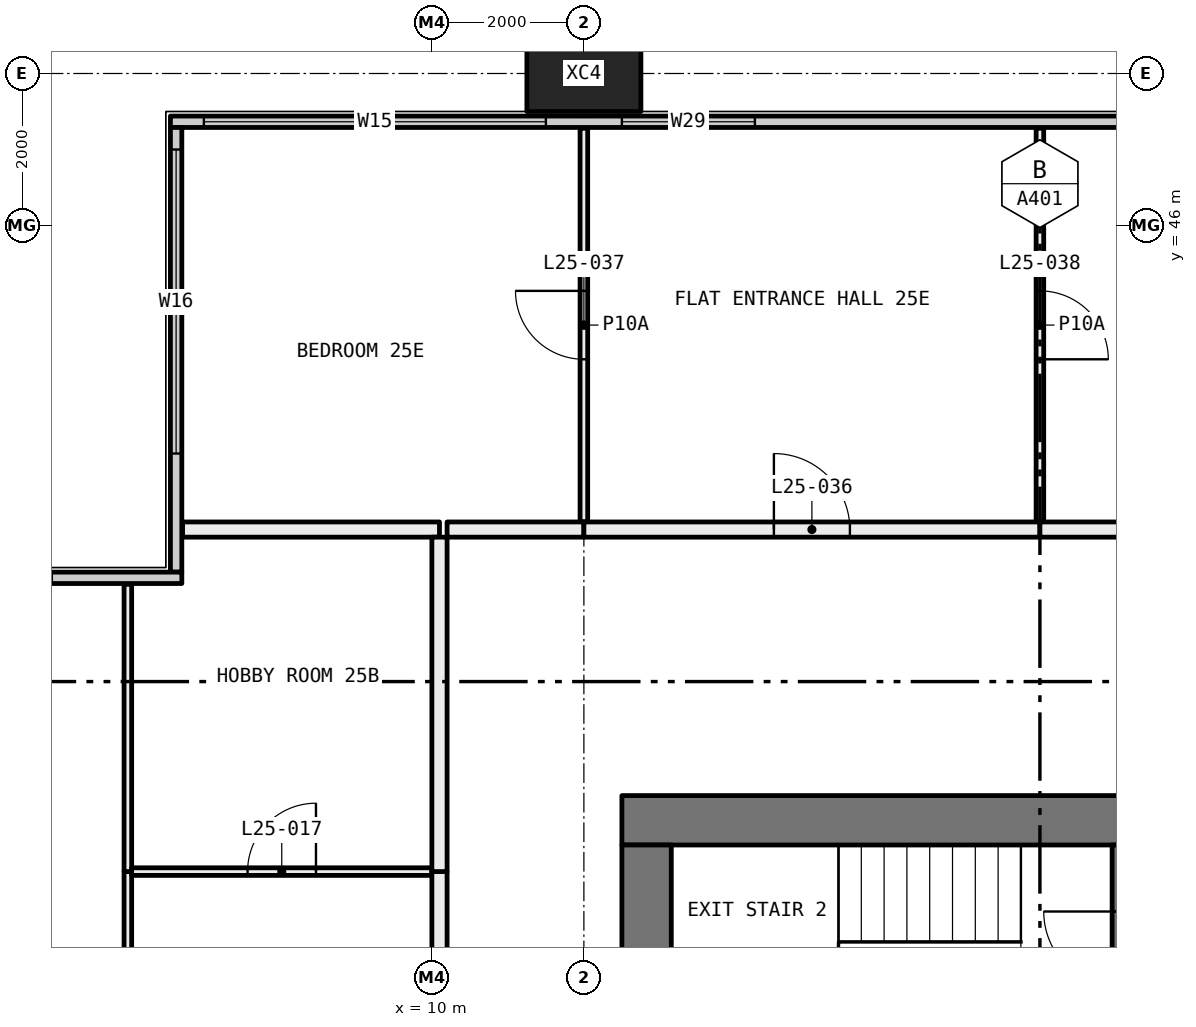
"""IFC4 building model, lengths in metres.
Left out: names, types, materials, properties, quantities, classifications, styles, units other than length and angle.
Written with IfcOpenShell. Run it as: python <this file> out.ifc"""

import sys

from ifc_helpers import new_model, si_unit, direction, frame, frame_2d, origin, origin_2d, place, context, subcontext, project, spatial, rectangle, hollow_rectangle, extrude, element, fill, save


model = new_model("IFC4")
c1 = context("Model", 3, precision=1e-05, world=origin(), true_north=direction((0.0, 1.0)))
c2 = subcontext(c1, "Body", "Model", "MODEL_VIEW")
j1 = project(units=[si_unit("LENGTHUNIT", "METRE"), si_unit("PLANEANGLEUNIT", "RADIAN")], contexts=[c1])
p1 = place(None, origin())
s1 = spatial("IfcSite", under=j1, at=p1, CompositionType="ELEMENT")
p2 = place(p1, origin())
s2 = spatial("IfcBuilding", under=s1, at=p2, CompositionType="ELEMENT")
p3 = place(p2, frame((0.0, 0.0, 100.05)))
s3 = spatial("IfcBuildingStorey", under=s2, at=p3, CompositionType="ELEMENT", Elevation=100.05)
p4 = place(p3, frame((12.0, 48.0, -0.4), z_axis=(0.0, 0.0, 1.0), x_axis=(1.0, 0.0, 0.0)))
e1 = element("IfcColumn", 1, at=p4, inside=s3, PredefinedType="COLUMN", context=c2, shape_type="SweptSolid", body=[
    extrude(hollow_rectangle(XDim=1.5, YDim=1.0, WallThickness=0.06, at=origin_2d()), origin(), (0.0, 0.0, 1.0), 3.45),
])
p5 = place(p3, frame((6.56, 47.365, 0.0), z_axis=(0.0, 0.0, 1.0), x_axis=(1.0, 0.0, 0.0)))
e2 = element("IfcWall", 2, at=p5, inside=s3, PredefinedType="ELEMENTEDWALL", context=c2, shape_type="SweptSolid", body=[
    extrude(rectangle(XDim=58.88, YDim=0.15, at=frame_2d((29.44, 0.0))), origin(), (0.0, 0.0, 1.0), 3.05),
])
p6 = place(p5, frame((0.44, 0.0, 0.45)))
e3 = element("IfcOpeningElement", 3, at=p6, cuts=e2, PredefinedType="OPENING", context=c2, shape_type="SweptSolid", body=[
    extrude(rectangle(XDim=4.5, YDim=2.55, at=frame_2d((2.25, 1.275))), frame((0.0, 0.085, 0.0), z_axis=(0.0, -1.0, 0.0), x_axis=(1.0, 0.0, 0.0)), (0.0, 0.0, 1.0), 0.17),
])
p7 = place(p5, frame((5.94, 0.0, 0.45)))
e4 = element("IfcOpeningElement", 4, at=p7, cuts=e2, PredefinedType="OPENING", context=c2, shape_type="SweptSolid", body=[
    extrude(rectangle(XDim=1.75, YDim=2.55, at=frame_2d((0.875, 1.275))), frame((0.0, 0.085, 0.0), z_axis=(0.0, -1.0, 0.0), x_axis=(1.0, 0.0, 0.0)), (0.0, 0.0, 1.0), 0.17),
])
p8 = place(p5, frame((15.19, 0.0, 0.45)))
e5 = element("IfcOpeningElement", 5, at=p8, cuts=e2, PredefinedType="OPENING", context=c2, shape_type="SweptSolid", body=[
    extrude(rectangle(XDim=1.75, YDim=2.55, at=frame_2d((0.875, 1.275))), frame((0.0, 0.085, 0.0), z_axis=(0.0, -1.0, 0.0), x_axis=(1.0, 0.0, 0.0)), (0.0, 0.0, 1.0), 0.17),
])
p9 = place(p5, frame((17.94, 0.0, 0.45)))
e6 = element("IfcOpeningElement", 6, at=p9, cuts=e2, PredefinedType="OPENING", context=c2, shape_type="SweptSolid", body=[
    extrude(rectangle(XDim=1.75, YDim=2.55, at=frame_2d((0.875, 1.275))), frame((0.0, 0.085, 0.0), z_axis=(0.0, -1.0, 0.0), x_axis=(1.0, 0.0, 0.0)), (0.0, 0.0, 1.0), 0.17),
])
p10 = place(p5, frame((27.19, 0.0, 0.45)))
e7 = element("IfcOpeningElement", 7, at=p10, cuts=e2, PredefinedType="OPENING", context=c2, shape_type="SweptSolid", body=[
    extrude(rectangle(XDim=1.75, YDim=2.55, at=frame_2d((0.875, 1.275))), frame((0.0, 0.085, 0.0), z_axis=(0.0, -1.0, 0.0), x_axis=(1.0, 0.0, 0.0)), (0.0, 0.0, 1.0), 0.17),
])
p11 = place(p5, frame((29.94, 0.0, 0.45)))
e8 = element("IfcOpeningElement", 8, at=p11, cuts=e2, PredefinedType="OPENING", context=c2, shape_type="SweptSolid", body=[
    extrude(rectangle(XDim=1.75, YDim=2.55, at=frame_2d((0.875, 1.275))), frame((0.0, 0.085, 0.0), z_axis=(0.0, -1.0, 0.0), x_axis=(1.0, 0.0, 0.0)), (0.0, 0.0, 1.0), 0.17),
])
p12 = place(p5, frame((39.19, 0.0, 0.45)))
e9 = element("IfcOpeningElement", 9, at=p12, cuts=e2, PredefinedType="OPENING", context=c2, shape_type="SweptSolid", body=[
    extrude(rectangle(XDim=1.75, YDim=2.55, at=frame_2d((0.875, 1.275))), frame((0.0, 0.085, 0.0), z_axis=(0.0, -1.0, 0.0), x_axis=(1.0, 0.0, 0.0)), (0.0, 0.0, 1.0), 0.17),
])
p13 = place(p5, frame((41.94, 0.0, 0.45)))
e10 = element("IfcOpeningElement", 10, at=p13, cuts=e2, PredefinedType="OPENING", context=c2, shape_type="SweptSolid", body=[
    extrude(rectangle(XDim=1.75, YDim=2.55, at=frame_2d((0.875, 1.275))), frame((0.0, 0.085, 0.0), z_axis=(0.0, -1.0, 0.0), x_axis=(1.0, 0.0, 0.0)), (0.0, 0.0, 1.0), 0.17),
])
p14 = place(p5, frame((51.19, 0.0, 0.45)))
e11 = element("IfcOpeningElement", 11, at=p14, cuts=e2, PredefinedType="OPENING", context=c2, shape_type="SweptSolid", body=[
    extrude(rectangle(XDim=1.75, YDim=2.55, at=frame_2d((0.875, 1.275))), frame((0.0, 0.085, 0.0), z_axis=(0.0, -1.0, 0.0), x_axis=(1.0, 0.0, 0.0)), (0.0, 0.0, 1.0), 0.17),
])
p15 = place(p5, frame((53.94, 0.0, 0.45)))
e12 = element("IfcOpeningElement", 12, at=p15, cuts=e2, PredefinedType="OPENING", context=c2, shape_type="SweptSolid", body=[
    extrude(rectangle(XDim=4.5, YDim=2.55, at=frame_2d((2.25, 1.275))), frame((0.0, 0.085, 0.0), z_axis=(0.0, -1.0, 0.0), x_axis=(1.0, 0.0, 0.0)), (0.0, 0.0, 1.0), 0.17),
])
p16 = place(p3, frame((6.635, 41.44, 0.0), z_axis=(0.0, 0.0, 1.0), x_axis=(0.0, 1.0, 0.0)))
e13 = element("IfcWall", 13, at=p16, inside=s3, PredefinedType="ELEMENTEDWALL", context=c2, shape_type="SweptSolid", body=[
    extrude(rectangle(XDim=5.85, YDim=0.15, at=frame_2d((2.925, 0.0))), origin(), (0.0, 0.0, 1.0), 3.05),
])
p17 = place(p16, frame((1.56, 0.0, 0.45)))
e14 = element("IfcOpeningElement", 14, at=p17, cuts=e13, PredefinedType="OPENING", context=c2, shape_type="SweptSolid", body=[
    extrude(rectangle(XDim=4.0, YDim=2.55, at=frame_2d((2.0, 1.275))), frame((0.0, 0.085, 0.0), z_axis=(0.0, -1.0, 0.0), x_axis=(1.0, 0.0, 0.0)), (0.0, 0.0, 1.0), 0.17),
])
p18 = place(p3, frame((0.56, 41.365, 0.0), z_axis=(0.0, 0.0, 1.0), x_axis=(1.0, 0.0, 0.0)))
e15 = element("IfcWall", 15, at=p18, inside=s3, PredefinedType="ELEMENTEDWALL", context=c2, shape_type="SweptSolid", body=[
    extrude(rectangle(XDim=6.15, YDim=0.15, at=frame_2d((3.075, 0.0))), origin(), (0.0, 0.0, 1.0), 3.05),
])
p19 = place(p18, frame((0.44, 0.0, 0.45)))
e16 = element("IfcOpeningElement", 16, at=p19, cuts=e15, PredefinedType="OPENING", context=c2, shape_type="SweptSolid", body=[
    extrude(rectangle(XDim=4.0, YDim=2.55, at=frame_2d((2.0, 1.275))), frame((0.0, 0.085, 0.0), z_axis=(0.0, -1.0, 0.0), x_axis=(1.0, 0.0, 0.0)), (0.0, 0.0, 1.0), 0.17),
])
p20 = place(p3, frame((6.0, 36.1, 0.0), z_axis=(0.0, 0.0, 1.0), x_axis=(0.0, 1.0, 0.0)))
e17 = element("IfcWall", 17, at=p20, inside=s3, PredefinedType="PARTITIONING", context=c2, shape_type="SweptSolid", body=[
    extrude(rectangle(XDim=1.4, YDim=0.1, at=frame_2d((0.7, 0.0))), origin(), (0.0, 0.0, 1.0), 3.05),
])
p21 = place(p3, frame((6.0, 37.5, 0.0), z_axis=(0.0, 0.0, 1.0), x_axis=(0.0, 1.0, 0.0)))
e18 = element("IfcWall", 18, at=p21, inside=s3, PredefinedType="PARTITIONING", context=c2, shape_type="SweptSolid", body=[
    extrude(rectangle(XDim=3.78, YDim=0.1, at=frame_2d((1.89, 0.0))), origin(), (0.0, 0.0, 1.0), 3.05),
])
p22 = place(p3, frame((10.0, 37.5, 0.0), z_axis=(0.0, 0.0, 1.0), x_axis=(-1.0, 0.0, 0.0)))
e19 = element("IfcWall", 19, at=p22, inside=s3, PredefinedType="PARTITIONING", context=c2, shape_type="SweptSolid", body=[
    extrude(rectangle(XDim=3.95, YDim=0.1, at=frame_2d((1.975, 0.0))), origin(), (0.0, 0.0, 1.0), 3.05),
])
p23 = place(p22, frame((1.525, 0.0, 0.0)))
e20 = element("IfcOpeningElement", 20, at=p23, cuts=e19, PredefinedType="OPENING", context=c2, shape_type="SweptSolid", body=[
    extrude(rectangle(XDim=0.9, YDim=2.1, at=frame_2d((0.45, 1.05))), frame((0.0, 0.06, 0.0), z_axis=(0.0, -1.0, 0.0), x_axis=(1.0, 0.0, 0.0)), (0.0, 0.0, 1.0), 0.12),
])
p24 = place(p3, frame((10.1, 36.1, 0.0), z_axis=(0.0, 0.0, 1.0), x_axis=(0.0, 1.0, 0.0)))
e21 = element("IfcWall", 21, at=p24, inside=s3, PredefinedType="PARTITIONING", context=c2, shape_type="SweptSolid", body=[
    extrude(rectangle(XDim=1.4, YDim=0.2, at=frame_2d((0.7, 0.0))), origin(), (0.0, 0.0, 1.0), 3.05),
])
p25 = place(p3, frame((10.1, 42.0, 0.0), z_axis=(0.0, 0.0, 1.0), x_axis=(-1.0, 0.0, 0.0)))
e22 = element("IfcWall", 22, at=p25, inside=s3, PredefinedType="PARTITIONING", context=c2, shape_type="SweptSolid", body=[
    extrude(rectangle(XDim=3.38, YDim=0.2, at=frame_2d((1.69, 0.0))), origin(), (0.0, 0.0, 1.0), 3.05),
])
p26 = place(p3, frame((10.1, 37.5, 0.0), z_axis=(0.0, 0.0, 1.0), x_axis=(0.0, 1.0, 0.0)))
e23 = element("IfcWall", 23, at=p26, inside=s3, PredefinedType="PARTITIONING", context=c2, shape_type="SweptSolid", body=[
    extrude(rectangle(XDim=4.4, YDim=0.2, at=frame_2d((2.2, 0.0))), origin(), (0.0, 0.0, 1.0), 3.05),
])
p27 = place(p3, frame((12.0, 42.1, 0.0), z_axis=(0.0, 0.0, 1.0), x_axis=(0.0, 1.0, 0.0)))
e24 = element("IfcWall", 24, at=p27, inside=s3, PredefinedType="PARTITIONING", context=c2, shape_type="SweptSolid", body=[
    extrude(rectangle(XDim=5.18, YDim=0.1, at=frame_2d((2.59, 0.0))), origin(), (0.0, 0.0, 1.0), 3.05),
])
p28 = place(p27, frame((2.14, 0.0, 0.0)))
e25 = element("IfcOpeningElement", 25, at=p28, cuts=e24, PredefinedType="OPENING", context=c2, shape_type="SweptSolid", body=[
    extrude(rectangle(XDim=0.9, YDim=2.1, at=frame_2d((0.45, 1.05))), frame((0.0, 0.06, 0.0), z_axis=(0.0, -1.0, 0.0), x_axis=(1.0, 0.0, 0.0)), (0.0, 0.0, 1.0), 0.12),
])
p29 = place(p3, frame((10.2, 42.0, 0.0), z_axis=(0.0, 0.0, 1.0), x_axis=(1.0, 0.0, 0.0)))
e26 = element("IfcWall", 26, at=p29, inside=s3, PredefinedType="PARTITIONING", context=c2, shape_type="SweptSolid", body=[
    extrude(rectangle(XDim=1.8, YDim=0.2, at=frame_2d((0.9, 0.0))), origin(), (0.0, 0.0, 1.0), 3.05),
])
p30 = place(p3, frame((18.0, 42.1, 0.0), z_axis=(0.0, 0.0, 1.0), x_axis=(0.0, 1.0, 0.0)))
e27 = element("IfcWall", 27, at=p30, inside=s3, PredefinedType="PARTITIONING", context=c2, shape_type="SweptSolid", body=[
    extrude(rectangle(XDim=5.18, YDim=0.1, at=frame_2d((2.59, 0.0))), origin(), (0.0, 0.0, 1.0), 3.05),
])
p31 = place(p30, frame((2.14, 0.0, 0.0)))
e28 = element("IfcOpeningElement", 28, at=p31, cuts=e27, PredefinedType="OPENING", context=c2, shape_type="SweptSolid", body=[
    extrude(rectangle(XDim=0.9, YDim=2.1, at=frame_2d((0.45, 1.05))), frame((0.0, 0.06, 0.0), z_axis=(0.0, -1.0, 0.0), x_axis=(1.0, 0.0, 0.0)), (0.0, 0.0, 1.0), 0.12),
])
p32 = place(p3, frame((12.0, 42.0, 0.0), z_axis=(0.0, 0.0, 1.0), x_axis=(1.0, 0.0, 0.0)))
e29 = element("IfcWall", 29, at=p32, inside=s3, PredefinedType="PARTITIONING", context=c2, shape_type="SweptSolid", body=[
    extrude(rectangle(XDim=6.0, YDim=0.2, at=frame_2d((3.0, 0.0))), origin(), (0.0, 0.0, 1.0), 3.05),
])
p33 = place(p32, frame((2.5, 0.0, 0.0)))
e30 = element("IfcOpeningElement", 30, at=p33, cuts=e29, PredefinedType="OPENING", context=c2, shape_type="SweptSolid", body=[
    extrude(rectangle(XDim=1.0, YDim=2.1, at=frame_2d((0.5, 1.05))), frame((0.0, 0.11, 0.0), z_axis=(0.0, -1.0, 0.0), x_axis=(1.0, 0.0, 0.0)), (0.0, 0.0, 1.0), 0.22),
])
p34 = place(p3, frame((18.0, 42.0, 0.0), z_axis=(0.0, 0.0, 1.0), x_axis=(1.0, 0.0, 0.0)))
e31 = element("IfcWall", 31, at=p34, inside=s3, PredefinedType="PARTITIONING", context=c2, shape_type="SweptSolid", body=[
    extrude(rectangle(XDim=6.0, YDim=0.2, at=frame_2d((3.0, 0.0))), origin(), (0.0, 0.0, 1.0), 3.05),
])
p35 = place(p3, frame((12.5, 38.175, 0.0), z_axis=(0.0, 0.0, 1.0), x_axis=(1.0, 0.0, 0.0)))
e32 = element("IfcWall", 32, at=p35, inside=s3, PredefinedType="SHEAR", context=c2, shape_type="SweptSolid", body=[
    extrude(rectangle(XDim=11.0, YDim=0.65, at=frame_2d((5.5, 0.0))), origin(), (0.0, 0.0, 1.0), 3.05),
])
p36 = place(p35, frame((8.475, 0.0, 0.0)))
e33 = element("IfcOpeningElement", 33, at=p36, cuts=e32, PredefinedType="OPENING", context=c2, shape_type="SweptSolid", body=[
    extrude(rectangle(XDim=1.6, YDim=2.1, at=frame_2d((0.8, 1.05))), frame((0.0, 0.335, 0.0), z_axis=(0.0, -1.0, 0.0), x_axis=(1.0, 0.0, 0.0)), (0.0, 0.0, 1.0), 0.67),
])
p37 = place(p3, frame((12.825, 22.15, 0.0), z_axis=(0.0, 0.0, 1.0), x_axis=(0.0, 1.0, 0.0)))
e34 = element("IfcWall", 34, at=p37, inside=s3, PredefinedType="SHEAR", context=c2, shape_type="SweptSolid", body=[
    extrude(rectangle(XDim=15.7, YDim=0.65, at=frame_2d((7.85, 0.0))), origin(), (0.0, 0.0, 1.0), 3.05),
])
p38 = place(p37, frame((8.3, 0.0, 0.0)))
e35 = element("IfcOpeningElement", 35, at=p38, cuts=e34, PredefinedType="OPENING", context=c2, shape_type="SweptSolid", body=[
    extrude(rectangle(XDim=1.6, YDim=2.1, at=frame_2d((0.8, 1.05))), frame((0.0, 0.335, 0.0), z_axis=(0.0, -1.0, 0.0), x_axis=(1.0, 0.0, 0.0)), (0.0, 0.0, 1.0), 0.67),
])
p39 = place(p37, frame((2.125, 0.0, 0.0)))
e36 = element("IfcOpeningElement", 36, at=p39, cuts=e34, PredefinedType="OPENING", context=c2, shape_type="SweptSolid", body=[
    extrude(rectangle(XDim=1.0, YDim=2.1, at=frame_2d((0.5, 1.05))), frame((0.0, 0.335, 0.0), z_axis=(0.0, -1.0, 0.0), x_axis=(1.0, 0.0, 0.0)), (0.0, 0.0, 1.0), 0.67),
])
p40 = place(p3, frame((19.05, 35.1, 0.0), z_axis=(0.0, 0.0, 1.0), x_axis=(0.0, 1.0, 0.0)))
e37 = element("IfcWall", 37, at=p40, inside=s3, PredefinedType="SOLIDWALL", context=c2, shape_type="SweptSolid", body=[
    extrude(rectangle(XDim=2.75, YDim=0.2, at=frame_2d((1.375, 0.0))), origin(), (0.0, 0.0, 1.0), 3.05),
])
p41 = place(p40, frame((0.875, 0.0, 0.0)))
e38 = element("IfcOpeningElement", 38, at=p41, cuts=e37, PredefinedType="OPENING", context=c2, shape_type="SweptSolid", body=[
    extrude(rectangle(XDim=1.0, YDim=2.1, at=frame_2d((0.5, 1.05))), frame((0.0, 0.11, 0.0), z_axis=(0.0, -1.0, 0.0), x_axis=(1.0, 0.0, 0.0)), (0.0, 0.0, 1.0), 0.22),
])
p42 = place(p6, origin())
e39 = element("IfcWindow", 39, at=p42, inside=s3, PartitioningType="SINGLE_PANEL", PredefinedType="WINDOW", context=c2, shape_type="SweptSolid", body=[
    extrude(rectangle(XDim=4.5, YDim=2.55, at=frame_2d((2.25, 1.275))), frame((0.0, 0.03, 0.0), z_axis=(0.0, -1.0, 0.0), x_axis=(1.0, 0.0, 0.0)), (0.0, 0.0, 1.0), 0.06),
])
fill(e3, e39)
p43 = place(p7, origin())
e40 = element("IfcWindow", 40, at=p43, inside=s3, PartitioningType="SINGLE_PANEL", PredefinedType="WINDOW", context=c2, shape_type="SweptSolid", body=[
    extrude(rectangle(XDim=1.75, YDim=2.55, at=frame_2d((0.875, 1.275))), frame((0.0, 0.03, 0.0), z_axis=(0.0, -1.0, 0.0), x_axis=(1.0, 0.0, 0.0)), (0.0, 0.0, 1.0), 0.06),
])
fill(e4, e40)
p44 = place(p17, origin())
e41 = element("IfcWindow", 41, at=p44, inside=s3, PartitioningType="SINGLE_PANEL", PredefinedType="WINDOW", context=c2, shape_type="SweptSolid", body=[
    extrude(rectangle(XDim=4.0, YDim=2.55, at=frame_2d((2.0, 1.275))), frame((0.0, 0.03, 0.0), z_axis=(0.0, -1.0, 0.0), x_axis=(1.0, 0.0, 0.0)), (0.0, 0.0, 1.0), 0.06),
])
fill(e14, e41)
p45 = place(p23, frame((0.9, 0.0, 0.0), x_axis=(-1.0, 0.0, 0.0)))
e42 = element("IfcDoor", 42, at=p45, inside=s3, OperationType="SINGLE_SWING_LEFT", PredefinedType="DOOR", context=c2, shape_type="SweptSolid", body=[
    extrude(rectangle(XDim=0.9, YDim=2.1, at=frame_2d((0.45, 1.05))), frame((0.0, 0.025, 0.0), z_axis=(0.0, -1.0, 0.0), x_axis=(1.0, 0.0, 0.0)), (0.0, 0.0, 1.0), 0.05),
])
fill(e20, e42)
p46 = place(p33, origin())
e43 = element("IfcDoor", 43, at=p46, inside=s3, OperationType="SINGLE_SWING_RIGHT", PredefinedType="DOOR", context=c2, shape_type="SweptSolid", body=[
    extrude(rectangle(XDim=1.0, YDim=2.1, at=frame_2d((0.5, 1.05))), frame((0.0, 0.025, 0.0), z_axis=(0.0, -1.0, 0.0), x_axis=(1.0, 0.0, 0.0)), (0.0, 0.0, 1.0), 0.05),
])
fill(e30, e43)
p47 = place(p28, origin())
e44 = element("IfcDoor", 44, at=p47, inside=s3, OperationType="SINGLE_SWING_LEFT", PredefinedType="DOOR", context=c2, shape_type="SweptSolid", body=[
    extrude(rectangle(XDim=0.9, YDim=2.1, at=frame_2d((0.45, 1.05))), frame((0.0, 0.025, 0.0), z_axis=(0.0, -1.0, 0.0), x_axis=(1.0, 0.0, 0.0)), (0.0, 0.0, 1.0), 0.05),
])
fill(e25, e44)
p48 = place(p31, frame((0.9, 0.0, 0.0), x_axis=(-1.0, 0.0, 0.0)))
e45 = element("IfcDoor", 45, at=p48, inside=s3, OperationType="SINGLE_SWING_LEFT", PredefinedType="DOOR", context=c2, shape_type="SweptSolid", body=[
    extrude(rectangle(XDim=0.9, YDim=2.1, at=frame_2d((0.45, 1.05))), frame((0.0, 0.025, 0.0), z_axis=(0.0, -1.0, 0.0), x_axis=(1.0, 0.0, 0.0)), (0.0, 0.0, 1.0), 0.05),
])
fill(e28, e45)
save(model, sys.argv[1])
